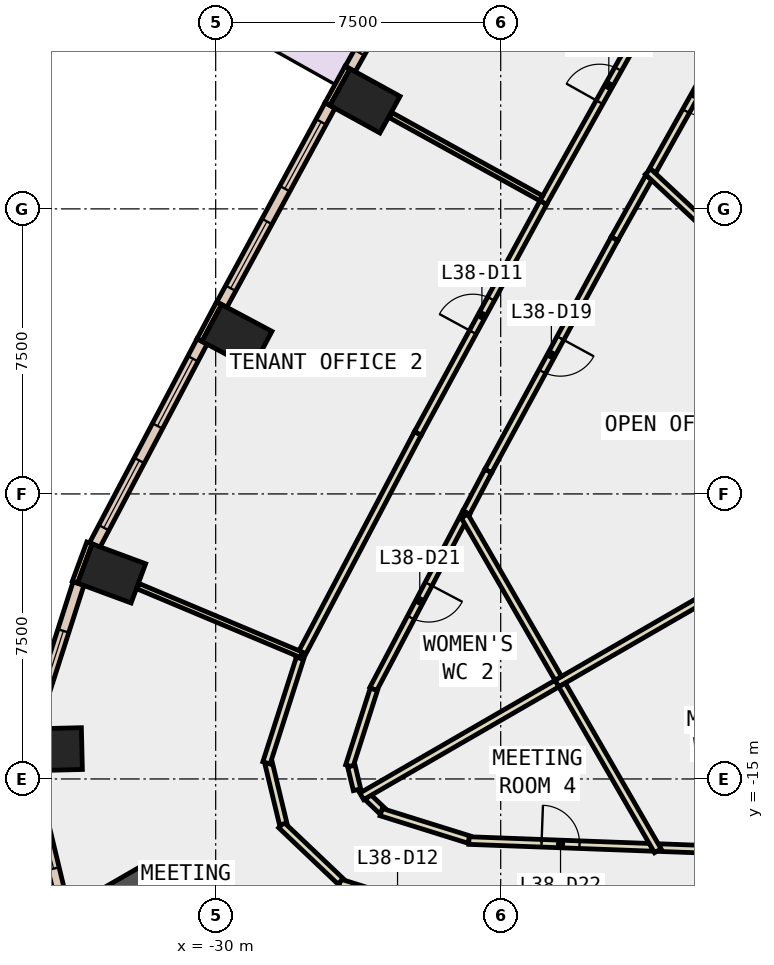
"""IFC4 building model, lengths in metres.
Left out: names, types, materials, properties, quantities, classifications, styles, units other than length and angle.
Written with IfcOpenShell. Run it as: python <this file> out.ifc"""

import sys

from ifc_helpers import new_model, si_unit, direction, frame, frame_2d, origin, origin_2d, place, context, subcontext, project, spatial, rectangle, extrude, element, fill, save


model = new_model("IFC4")
c1 = context("Model", 3, precision=1e-05, world=origin(), true_north=direction((0.0, 1.0)))
c2 = subcontext(c1, "Body", "Model", "MODEL_VIEW")
j1 = project(units=[si_unit("LENGTHUNIT", "METRE"), si_unit("PLANEANGLEUNIT", "RADIAN")], contexts=[c1])
p1 = place(None, origin())
s1 = spatial("IfcSite", under=j1, at=p1, CompositionType="ELEMENT")
p2 = place(p1, origin())
s2 = spatial("IfcBuilding", under=s1, at=p2, CompositionType="ELEMENT")
p3 = place(p2, frame((0.0, 0.0, 171.8)))
s3 = spatial("IfcBuildingStorey", under=s2, at=p3, CompositionType="ELEMENT", Elevation=171.8)
for number, where, z_axis, x_axis in (
    (1, (-26.071, 2.841, -0.4), (0.0, 0.0, 1.0), (0.482, 0.876, 0.0)),
    (2, (-29.44, -3.355, -0.4), (0.0, 0.0, 1.0), (0.47, 0.883, 0.0)),
    (3, (-32.738, -9.593, -0.4), (0.0, 0.0, 1.0), (0.347, 0.938, 0.0)),
    (4, (-34.271, -14.219, -0.4), (0.0, 0.0, 1.0), (-0.024, 1.0, 0.0)),
):
    element("IfcColumn", number, at=place(p3, frame(where, z_axis=z_axis, x_axis=x_axis)), inside=s3, PredefinedType="COLUMN", context=c2, shape_type="SweptSolid", body=[
        extrude(rectangle(XDim=1.1, YDim=1.5, at=origin_2d()), origin(), (0.0, 0.0, 1.0), 4.2),
    ])
p4 = place(p3, frame((-32.244, -18.615, -0.4), z_axis=(0.0, 0.0, 1.0), x_axis=(0.866025403784, 0.5, 0.0)))
e5 = element("IfcColumn", 5, at=p4, inside=s3, PredefinedType="COLUMN", context=c2, shape_type="SweptSolid", body=[
    extrude(rectangle(XDim=2.0, YDim=2.0, at=origin_2d()), origin(), (0.0, 0.0, 1.0), 4.2),
])
for number, where, z_axis, x_axis in (
    (6, (-26.529, 3.721, 0.0), (0.0, 0.0, 1.0), (-0.482, -0.876, 0.0)),
    (7, (-29.909, -2.482, 0.0), (0.0, 0.0, 1.0), (-0.47, -0.883, 0.0)),
    (8, (-33.321, -8.791, 0.0), (0.0, 0.0, 1.0), (-0.346, -0.938, 0.0)),
):
    element("IfcWall", number, at=place(p3, frame(where, z_axis=z_axis, x_axis=x_axis)), inside=s3, PredefinedType="STANDARD", context=c2, shape_type="SweptSolid", body=[
        extrude(rectangle(XDim=1.1, YDim=0.15, at=frame_2d((0.55, 0.0))), origin(), (0.0, 0.0, 1.0), 3.8),
    ])
p5 = place(p3, frame((-23.544, 8.883, 0.0), z_axis=(0.0, 0.0, 1.0), x_axis=(-0.489032196971, -0.87226573378, 0.0)))
e9 = element("IfcWall", 9, at=p5, inside=s3, PredefinedType="STANDARD", context=c2, shape_type="SweptSolid", body=[
    extrude(rectangle(XDim=5.963, YDim=0.3, at=frame_2d((2.981, 0.0))), origin(), (0.0, 0.0, 1.0), 3.8),
])
p6 = place(p5, frame((0.491, 0.0, 0.0)))
e10 = element("IfcOpeningElement", 10, at=p6, cuts=e9, PredefinedType="OPENING", context=c2, shape_type="SweptSolid", body=[
    extrude(rectangle(XDim=2.0, YDim=2.4, at=frame_2d((1.0, 1.2))), frame((0.0, 0.16, 0.0), z_axis=(0.0, -1.0, 0.0), x_axis=(1.0, 0.0, 0.0)), (0.0, 0.0, 1.0), 0.32),
])
p7 = place(p5, frame((3.472, 0.0, 0.9)))
e11 = element("IfcOpeningElement", 11, at=p7, cuts=e9, PredefinedType="OPENING", context=c2, shape_type="SweptSolid", body=[
    extrude(rectangle(XDim=2.0, YDim=2.6, at=frame_2d((1.0, 1.3))), frame((0.0, 0.16, 0.0), z_axis=(0.0, -1.0, 0.0), x_axis=(1.0, 0.0, 0.0)), (0.0, 0.0, 1.0), 0.32),
])
p8 = place(p3, frame((-26.991, 2.72, 0.0), z_axis=(0.0, 0.0, 1.0), x_axis=(-0.477555226268, -0.878601733361, 0.0)))
e12 = element("IfcWall", 12, at=p8, inside=s3, PredefinedType="STANDARD", context=c2, shape_type="SweptSolid", body=[
    extrude(rectangle(XDim=5.964, YDim=0.3, at=frame_2d((2.982, 0.0))), origin(), (0.0, 0.0, 1.0), 3.8),
])
p9 = place(p8, frame((0.491, 0.0, 0.9)))
e13 = element("IfcOpeningElement", 13, at=p9, cuts=e12, PredefinedType="OPENING", context=c2, shape_type="SweptSolid", body=[
    extrude(rectangle(XDim=2.0, YDim=2.6, at=frame_2d((1.0, 1.3))), frame((0.0, 0.16, 0.0), z_axis=(0.0, -1.0, 0.0), x_axis=(1.0, 0.0, 0.0)), (0.0, 0.0, 1.0), 0.32),
])
p10 = place(p8, frame((3.473, 0.0, 0.9)))
e14 = element("IfcOpeningElement", 14, at=p10, cuts=e12, PredefinedType="OPENING", context=c2, shape_type="SweptSolid", body=[
    extrude(rectangle(XDim=2.0, YDim=2.6, at=frame_2d((1.0, 1.3))), frame((0.0, 0.16, 0.0), z_axis=(0.0, -1.0, 0.0), x_axis=(1.0, 0.0, 0.0)), (0.0, 0.0, 1.0), 0.32),
])
p11 = place(p3, frame((-30.358, -3.488, 0.0), z_axis=(0.0, 0.0, 1.0), x_axis=(-0.466399410196, -0.884574242316, 0.0)))
e15 = element("IfcWall", 15, at=p11, inside=s3, PredefinedType="STANDARD", context=c2, shape_type="SweptSolid", body=[
    extrude(rectangle(XDim=6.055, YDim=0.3, at=frame_2d((3.027, 0.0))), origin(), (0.0, 0.0, 1.0), 3.8),
])
p12 = place(p11, frame((0.514, 0.0, 0.9)))
e16 = element("IfcOpeningElement", 16, at=p12, cuts=e15, PredefinedType="OPENING", context=c2, shape_type="SweptSolid", body=[
    extrude(rectangle(XDim=2.0, YDim=2.6, at=frame_2d((1.0, 1.3))), frame((0.0, 0.16, 0.0), z_axis=(0.0, -1.0, 0.0), x_axis=(1.0, 0.0, 0.0)), (0.0, 0.0, 1.0), 0.32),
])
p13 = place(p11, frame((3.541, 0.0, 0.9)))
e17 = element("IfcOpeningElement", 17, at=p13, cuts=e15, PredefinedType="OPENING", context=c2, shape_type="SweptSolid", body=[
    extrude(rectangle(XDim=2.0, YDim=2.6, at=frame_2d((1.0, 1.3))), frame((0.0, 0.16, 0.0), z_axis=(0.0, -1.0, 0.0), x_axis=(1.0, 0.0, 0.0)), (0.0, 0.0, 1.0), 0.32),
])
p14 = place(p3, frame((-33.609, -9.856, 0.0), z_axis=(0.0, 0.0, 1.0), x_axis=(-0.305018133869, -0.952346543025, 0.0)))
e18 = element("IfcWall", 18, at=p14, inside=s3, PredefinedType="STANDARD", context=c2, shape_type="SweptSolid", body=[
    extrude(rectangle(XDim=4.02, YDim=0.3, at=frame_2d((2.01, 0.0))), origin(), (0.0, 0.0, 1.0), 3.8),
])
p15 = place(p14, frame((1.31, 0.0, 0.9)))
e19 = element("IfcOpeningElement", 19, at=p15, cuts=e18, PredefinedType="OPENING", context=c2, shape_type="SweptSolid", body=[
    extrude(rectangle(XDim=1.4, YDim=2.6, at=frame_2d((0.7, 1.3))), frame((0.0, 0.16, 0.0), z_axis=(0.0, -1.0, 0.0), x_axis=(1.0, 0.0, 0.0)), (0.0, 0.0, 1.0), 0.32),
])
p16 = place(p3, frame((-34.886, -14.783, 0.0), z_axis=(0.0, 0.0, 1.0), x_axis=(0.234102046927, -0.972212030179, 0.0)))
e20 = element("IfcWall", 20, at=p16, inside=s3, PredefinedType="STANDARD", context=c2, shape_type="SweptSolid", body=[
    extrude(rectangle(XDim=3.9, YDim=0.3, at=frame_2d((1.95, 0.0))), origin(), (0.0, 0.0, 1.0), 3.8),
])
p17 = place(p16, frame((1.25, 0.0, 0.9)))
e21 = element("IfcOpeningElement", 21, at=p17, cuts=e20, PredefinedType="OPENING", context=c2, shape_type="SweptSolid", body=[
    extrude(rectangle(XDim=1.4, YDim=2.6, at=frame_2d((0.7, 1.3))), frame((0.0, 0.16, 0.0), z_axis=(0.0, -1.0, 0.0), x_axis=(1.0, 0.0, 0.0)), (0.0, 0.0, 1.0), 0.32),
])
p18 = place(p3, frame((-16.255, 5.014, 0.0), z_axis=(0.0, 0.0, 1.0), x_axis=(-0.488988017817, -0.87229050117, 0.0)))
e22 = element("IfcWall", 22, at=p18, inside=s3, PredefinedType="PARTITIONING", context=c2, shape_type="SweptSolid", body=[
    extrude(rectangle(XDim=4.599, YDim=0.2, at=frame_2d((2.3, 0.0))), origin(), (0.0, 0.0, 1.0), 3.8),
])
p19 = place(p18, frame((1.8, 0.0, 0.0)))
e23 = element("IfcOpeningElement", 23, at=p19, cuts=e22, PredefinedType="OPENING", context=c2, shape_type="SweptSolid", body=[
    extrude(rectangle(XDim=1.0, YDim=2.1, at=frame_2d((0.5, 1.05))), frame((0.0, 0.11, 0.0), z_axis=(0.0, -1.0, 0.0), x_axis=(1.0, 0.0, 0.0)), (0.0, 0.0, 1.0), 0.22),
])
p20 = place(p3, frame((-18.602, 0.828, 0.0), z_axis=(0.0, 0.0, 1.0), x_axis=(-0.488969229043, -0.872301033502, 0.0)))
e24 = element("IfcWall", 24, at=p20, inside=s3, PredefinedType="PARTITIONING", context=c2, shape_type="SweptSolid", body=[
    extrude(rectangle(XDim=1.849, YDim=0.2, at=frame_2d((0.924, 0.0))), origin(), (0.0, 0.0, 1.0), 3.8),
])
p21 = place(p3, frame((-19.506, -0.785, 0.0), z_axis=(0.0, 0.0, 1.0), x_axis=(-0.477513909405, -0.878624189472, 0.0)))
e25 = element("IfcWall", 25, at=p21, inside=s3, PredefinedType="PARTITIONING", context=c2, shape_type="SweptSolid", body=[
    extrude(rectangle(XDim=6.956, YDim=0.2, at=frame_2d((3.478, 0.0))), origin(), (0.0, 0.0, 1.0), 3.8),
])
p22 = place(p21, frame((2.978, 0.0, 0.0)))
e26 = element("IfcOpeningElement", 26, at=p22, cuts=e25, PredefinedType="OPENING", context=c2, shape_type="SweptSolid", body=[
    extrude(rectangle(XDim=1.0, YDim=2.1, at=frame_2d((0.5, 1.05))), frame((0.0, 0.11, 0.0), z_axis=(0.0, -1.0, 0.0), x_axis=(1.0, 0.0, 0.0)), (0.0, 0.0, 1.0), 0.22),
])
p23 = place(p3, frame((-22.828, -6.897, 0.0), z_axis=(0.0, 0.0, 1.0), x_axis=(-0.467225806893, -0.884138023938, 0.0)))
e27 = element("IfcWall", 27, at=p23, inside=s3, PredefinedType="PARTITIONING", context=c2, shape_type="SweptSolid", body=[
    extrude(rectangle(XDim=1.237, YDim=0.2, at=frame_2d((0.619, 0.0))), origin(), (0.0, 0.0, 1.0), 3.8),
])
p24 = place(p3, frame((-18.316, -16.807, 0.0), z_axis=(0.0, 0.0, 1.0), x_axis=(0.999315981353, -0.036980662692, 0.0)))
e28 = element("IfcWall", 28, at=p24, inside=s3, PredefinedType="PARTITIONING", context=c2, shape_type="SweptSolid", body=[
    extrude(rectangle(XDim=2.331, YDim=0.2, at=frame_2d((1.165, 0.0))), origin(), (0.0, 0.0, 1.0), 3.8),
])
p25 = place(p3, frame((-23.406, -7.991, 0.0), z_axis=(0.0, 0.0, 1.0), x_axis=(-0.466307932558, -0.884622468646, 0.0)))
e29 = element("IfcWall", 29, at=p25, inside=s3, PredefinedType="PARTITIONING", context=c2, shape_type="SweptSolid", body=[
    extrude(rectangle(XDim=5.25, YDim=0.2, at=frame_2d((2.625, 0.0))), origin(), (0.0, 0.0, 1.0), 3.8),
])
p26 = place(p25, frame((2.125, 0.0, 0.0)))
e30 = element("IfcOpeningElement", 30, at=p26, cuts=e29, PredefinedType="OPENING", context=c2, shape_type="SweptSolid", body=[
    extrude(rectangle(XDim=1.0, YDim=2.1, at=frame_2d((0.5, 1.05))), frame((0.0, 0.11, 0.0), z_axis=(0.0, -1.0, 0.0), x_axis=(1.0, 0.0, 0.0)), (0.0, 0.0, 1.0), 0.22),
])
p27 = place(p3, frame((-25.838, -12.642, 0.0), z_axis=(0.0, 0.0, 1.0), x_axis=(-0.305169069368, -0.952298188122, 0.0)))
e31 = element("IfcWall", 31, at=p27, inside=s3, PredefinedType="PARTITIONING", context=c2, shape_type="SweptSolid", body=[
    extrude(rectangle(XDim=2.117, YDim=0.2, at=frame_2d((1.059, 0.0))), origin(), (0.0, 0.0, 1.0), 3.8),
])
p28 = place(p3, frame((-26.43, -14.66, 0.0), z_axis=(0.0, 0.0, 1.0), x_axis=(0.233574377125, -0.972338938, 0.0)))
e32 = element("IfcWall", 32, at=p28, inside=s3, PredefinedType="PARTITIONING", context=c2, shape_type="SweptSolid", body=[
    extrude(rectangle(XDim=0.642, YDim=0.2, at=frame_2d((0.321, 0.0))), origin(), (0.0, 0.0, 1.0), 3.8),
])
p29 = place(p3, frame((-25.998, -15.476, 0.0), z_axis=(0.0, 0.0, 1.0), x_axis=(0.724294499657, -0.689490737985, 0.0)))
e33 = element("IfcWall", 33, at=p29, inside=s3, PredefinedType="PARTITIONING", context=c2, shape_type="SweptSolid", body=[
    extrude(rectangle(XDim=0.519, YDim=0.2, at=frame_2d((0.26, 0.0))), origin(), (0.0, 0.0, 1.0), 3.8),
])
p30 = place(p3, frame((-25.645, -15.873, 0.0), z_axis=(0.0, 0.0, 1.0), x_axis=(0.95454810771, -0.298056890655, 0.0)))
e34 = element("IfcWall", 34, at=p30, inside=s3, PredefinedType="PARTITIONING", context=c2, shape_type="SweptSolid", body=[
    extrude(rectangle(XDim=2.422, YDim=0.2, at=frame_2d((1.211, 0.0))), origin(), (0.0, 0.0, 1.0), 3.8),
])
p31 = place(p3, frame((-23.337, -16.621, 0.0), z_axis=(0.0, 0.0, 1.0), x_axis=(0.999311710526, -0.037095892019, 0.0)))
e35 = element("IfcWall", 35, at=p31, inside=s3, PredefinedType="PARTITIONING", context=c2, shape_type="SweptSolid", body=[
    extrude(rectangle(XDim=4.824, YDim=0.2, at=frame_2d((2.412, 0.0))), origin(), (0.0, 0.0, 1.0), 3.8),
])
p32 = place(p31, frame((1.913, 0.0, 0.0)))
e36 = element("IfcOpeningElement", 36, at=p32, cuts=e35, PredefinedType="OPENING", context=c2, shape_type="SweptSolid", body=[
    extrude(rectangle(XDim=1.0, YDim=2.1, at=frame_2d((0.5, 1.05))), frame((0.0, 0.11, 0.0), z_axis=(0.0, -1.0, 0.0), x_axis=(1.0, 0.0, 0.0)), (0.0, 0.0, 1.0), 0.22),
])
p33 = place(p3, frame((-21.381, 0.165, 0.0), z_axis=(0.0, 0.0, 1.0), x_axis=(0.489014139272, 0.872275857509, 0.0)))
e37 = element("IfcWall", 37, at=p33, inside=s3, PredefinedType="PARTITIONING", context=c2, shape_type="SweptSolid", body=[
    extrude(rectangle(XDim=7.057, YDim=0.2, at=frame_2d((3.529, 0.0))), origin(), (0.0, 0.0, 1.0), 3.8),
])
p34 = place(p33, frame((3.029, 0.0, 0.0)))
e38 = element("IfcOpeningElement", 38, at=p34, cuts=e37, PredefinedType="OPENING", context=c2, shape_type="SweptSolid", body=[
    extrude(rectangle(XDim=1.0, YDim=2.1, at=frame_2d((0.5, 1.05))), frame((0.0, 0.11, 0.0), z_axis=(0.0, -1.0, 0.0), x_axis=(1.0, 0.0, 0.0)), (0.0, 0.0, 1.0), 0.22),
])
p35 = place(p3, frame((-27.798, -11.819, 0.0), z_axis=(0.0, 0.0, 1.0), x_axis=(0.466450727507, 0.884547182918, 0.0)))
e39 = element("IfcWall", 39, at=p35, inside=s3, PredefinedType="PARTITIONING", context=c2, shape_type="SweptSolid", body=[
    extrude(rectangle(XDim=6.685, YDim=0.2, at=frame_2d((3.342, 0.0))), origin(), (0.0, 0.0, 1.0), 3.8),
])
p36 = place(p3, frame((-24.68, -5.906, 0.0), z_axis=(0.0, 0.0, 1.0), x_axis=(0.47757676389, 0.878590026459, 0.0)))
e40 = element("IfcWall", 40, at=p36, inside=s3, PredefinedType="PARTITIONING", context=c2, shape_type="SweptSolid", body=[
    extrude(rectangle(XDim=6.91, YDim=0.2, at=frame_2d((3.455, 0.0))), origin(), (0.0, 0.0, 1.0), 3.8),
])
p37 = place(p36, frame((3.029, 0.0, 0.0)))
e41 = element("IfcOpeningElement", 41, at=p37, cuts=e40, PredefinedType="OPENING", context=c2, shape_type="SweptSolid", body=[
    extrude(rectangle(XDim=1.0, YDim=2.1, at=frame_2d((0.5, 1.05))), frame((0.0, 0.11, 0.0), z_axis=(0.0, -1.0, 0.0), x_axis=(1.0, 0.0, 0.0)), (0.0, 0.0, 1.0), 0.22),
])
p38 = place(p3, frame((-23.691, -18.683, 0.0), z_axis=(0.0, 0.0, 1.0), x_axis=(-0.954546657381, 0.298061535398, 0.0)))
e42 = element("IfcWall", 42, at=p38, inside=s3, PredefinedType="PARTITIONING", context=c2, shape_type="SweptSolid", body=[
    extrude(rectangle(XDim=3.191, YDim=0.2, at=frame_2d((1.596, 0.0))), origin(), (0.0, 0.0, 1.0), 3.8),
])
p39 = place(p38, frame((1.096, 0.0, 0.0)))
e43 = element("IfcOpeningElement", 43, at=p39, cuts=e42, PredefinedType="OPENING", context=c2, shape_type="SweptSolid", body=[
    extrude(rectangle(XDim=1.0, YDim=2.1, at=frame_2d((0.5, 1.05))), frame((0.0, 0.11, 0.0), z_axis=(0.0, -1.0, 0.0), x_axis=(1.0, 0.0, 0.0)), (0.0, 0.0, 1.0), 0.22),
])
p40 = place(p3, frame((-26.714, -17.693, 0.0), z_axis=(0.0, 0.0, 1.0), x_axis=(-0.724712974479, 0.689050872303, 0.0)))
e44 = element("IfcWall", 44, at=p40, inside=s3, PredefinedType="PARTITIONING", context=c2, shape_type="SweptSolid", body=[
    extrude(rectangle(XDim=2.15, YDim=0.2, at=frame_2d((1.075, 0.0))), origin(), (0.0, 0.0, 1.0), 3.8),
])
p41 = place(p3, frame((-28.223, -16.184, 0.0), z_axis=(0.0, 0.0, 1.0), x_axis=(-0.233826017197, 0.972278454807, 0.0)))
e45 = element("IfcWall", 45, at=p41, inside=s3, PredefinedType="PARTITIONING", context=c2, shape_type="SweptSolid", body=[
    extrude(rectangle(XDim=1.651, YDim=0.2, at=frame_2d((0.825, 0.0))), origin(), (0.0, 0.0, 1.0), 3.8),
])
p42 = place(p3, frame((-28.663, -14.577, 0.0), z_axis=(0.0, 0.0, 1.0), x_axis=(0.304925942137, 0.952376065329, 0.0)))
e46 = element("IfcWall", 46, at=p42, inside=s3, PredefinedType="PARTITIONING", context=c2, shape_type="SweptSolid", body=[
    extrude(rectangle(XDim=2.89, YDim=0.2, at=frame_2d((1.445, 0.0))), origin(), (0.0, 0.0, 1.0), 3.8),
])
p43 = place(p3, frame((-11.372, -5.79, 0.0), z_axis=(0.0, 0.0, 1.0), x_axis=(-0.730922728623, 0.682460229451, 0.0)))
e47 = element("IfcWall", 47, at=p43, inside=s3, PredefinedType="PARTITIONING", context=c2, shape_type="SweptSolid", body=[
    extrude(rectangle(XDim=9.924, YDim=0.2, at=frame_2d((4.962, 0.0))), origin(), (0.0, 0.0, 1.0), 3.8),
])
p44 = place(p3, frame((-16.952, -10.138, 0.0), z_axis=(0.0, 0.0, 1.0), x_axis=(-0.866054992606, -0.499948747156, 0.0)))
e48 = element("IfcWall", 48, at=p44, inside=s3, PredefinedType="PARTITIONING", context=c2, shape_type="SweptSolid", body=[
    extrude(rectangle(XDim=4.701, YDim=0.2, at=frame_2d((2.35, 0.0))), origin(), (0.0, 0.0, 1.0), 3.8),
])
p45 = place(p3, frame((-20.986, -12.351, 0.0), z_axis=(0.0, 0.0, 1.0), x_axis=(-0.499993851206, 0.866028953763, 0.0)))
e49 = element("IfcWall", 49, at=p45, inside=s3, PredefinedType="PARTITIONING", context=c2, shape_type="SweptSolid", body=[
    extrude(rectangle(XDim=4.932, YDim=0.2, at=frame_2d((2.466, 0.0))), origin(), (0.0, 0.0, 1.0), 3.8),
])
p46 = place(p3, frame((-18.366, -16.89, 0.0), z_axis=(0.0, 0.0, 1.0), x_axis=(-0.499965828395, 0.866045131871, 0.0)))
e50 = element("IfcWall", 50, at=p46, inside=s3, PredefinedType="PARTITIONING", context=c2, shape_type="SweptSolid", body=[
    extrude(rectangle(XDim=5.036, YDim=0.2, at=frame_2d((2.518, 0.0))), origin(), (0.0, 0.0, 1.0), 3.8),
])
p47 = place(p3, frame((-21.021, -12.491, 0.0), z_axis=(0.0, 0.0, 1.0), x_axis=(-0.865966890845, -0.500101333692, 0.0)))
e51 = element("IfcWall", 51, at=p47, inside=s3, PredefinedType="PARTITIONING", context=c2, shape_type="SweptSolid", body=[
    extrude(rectangle(XDim=5.931, YDim=0.2, at=frame_2d((2.965, 0.0))), origin(), (0.0, 0.0, 1.0), 3.8),
])
p48 = place(p3, frame((-21.432, 0.278, 0.0), z_axis=(0.0, 0.0, 1.0), x_axis=(-0.875412579047, 0.483376474857, 0.0)))
e52 = element("IfcWall", 52, at=p48, inside=s3, PredefinedType="PARTITIONING", context=c2, shape_type="SweptSolid", body=[
    extrude(rectangle(XDim=4.531, YDim=0.15, at=frame_2d((2.265, 0.0))), origin(), (0.0, 0.0, 1.0), 3.8),
])
p49 = place(p3, frame((-27.751, -11.73, 0.0), z_axis=(0.0, 0.0, 1.0), x_axis=(-0.92196786851, 0.387266380462, 0.0)))
e53 = element("IfcWall", 53, at=p49, inside=s3, PredefinedType="PARTITIONING", context=c2, shape_type="SweptSolid", body=[
    extrude(rectangle(XDim=4.653, YDim=0.15, at=frame_2d((2.327, 0.0))), origin(), (0.0, 0.0, 1.0), 3.8),
])
p50 = place(p7, origin())
e54 = element("IfcWindow", 54, at=p50, inside=s3, PartitioningType="SINGLE_PANEL", PredefinedType="WINDOW", context=c2, shape_type="SweptSolid", body=[
    extrude(rectangle(XDim=2.0, YDim=2.6, at=frame_2d((1.0, 1.3))), frame((0.0, 0.03, 0.0), z_axis=(0.0, -1.0, 0.0), x_axis=(1.0, 0.0, 0.0)), (0.0, 0.0, 1.0), 0.06),
])
fill(e11, e54)
p51 = place(p9, origin())
e55 = element("IfcWindow", 55, at=p51, inside=s3, PartitioningType="SINGLE_PANEL", PredefinedType="WINDOW", context=c2, shape_type="SweptSolid", body=[
    extrude(rectangle(XDim=2.0, YDim=2.6, at=frame_2d((1.0, 1.3))), frame((0.0, 0.03, 0.0), z_axis=(0.0, -1.0, 0.0), x_axis=(1.0, 0.0, 0.0)), (0.0, 0.0, 1.0), 0.06),
])
fill(e13, e55)
p52 = place(p10, origin())
e56 = element("IfcWindow", 56, at=p52, inside=s3, PartitioningType="SINGLE_PANEL", PredefinedType="WINDOW", context=c2, shape_type="SweptSolid", body=[
    extrude(rectangle(XDim=2.0, YDim=2.6, at=frame_2d((1.0, 1.3))), frame((0.0, 0.03, 0.0), z_axis=(0.0, -1.0, 0.0), x_axis=(1.0, 0.0, 0.0)), (0.0, 0.0, 1.0), 0.06),
])
fill(e14, e56)
p53 = place(p12, origin())
e57 = element("IfcWindow", 57, at=p53, inside=s3, PartitioningType="SINGLE_PANEL", PredefinedType="WINDOW", context=c2, shape_type="SweptSolid", body=[
    extrude(rectangle(XDim=2.0, YDim=2.6, at=frame_2d((1.0, 1.3))), frame((0.0, 0.03, 0.0), z_axis=(0.0, -1.0, 0.0), x_axis=(1.0, 0.0, 0.0)), (0.0, 0.0, 1.0), 0.06),
])
fill(e16, e57)
p54 = place(p13, origin())
e58 = element("IfcWindow", 58, at=p54, inside=s3, PartitioningType="SINGLE_PANEL", PredefinedType="WINDOW", context=c2, shape_type="SweptSolid", body=[
    extrude(rectangle(XDim=2.0, YDim=2.6, at=frame_2d((1.0, 1.3))), frame((0.0, 0.03, 0.0), z_axis=(0.0, -1.0, 0.0), x_axis=(1.0, 0.0, 0.0)), (0.0, 0.0, 1.0), 0.06),
])
fill(e17, e58)
p55 = place(p15, origin())
e59 = element("IfcWindow", 59, at=p55, inside=s3, PartitioningType="SINGLE_PANEL", PredefinedType="WINDOW", context=c2, shape_type="SweptSolid", body=[
    extrude(rectangle(XDim=1.4, YDim=2.6, at=frame_2d((0.7, 1.3))), frame((0.0, 0.03, 0.0), z_axis=(0.0, -1.0, 0.0), x_axis=(1.0, 0.0, 0.0)), (0.0, 0.0, 1.0), 0.06),
])
fill(e19, e59)
p56 = place(p17, origin())
e60 = element("IfcWindow", 60, at=p56, inside=s3, PartitioningType="SINGLE_PANEL", PredefinedType="WINDOW", context=c2, shape_type="SweptSolid", body=[
    extrude(rectangle(XDim=1.4, YDim=2.6, at=frame_2d((0.7, 1.3))), frame((0.0, 0.03, 0.0), z_axis=(0.0, -1.0, 0.0), x_axis=(1.0, 0.0, 0.0)), (0.0, 0.0, 1.0), 0.06),
])
fill(e21, e60)
p57 = place(p34, origin())
e61 = element("IfcDoor", 61, at=p57, inside=s3, OperationType="SINGLE_SWING_RIGHT", PredefinedType="DOOR", context=c2, shape_type="SweptSolid", body=[
    extrude(rectangle(XDim=1.0, YDim=2.1, at=frame_2d((0.5, 1.05))), frame((0.0, 0.025, 0.0), z_axis=(0.0, -1.0, 0.0), x_axis=(1.0, 0.0, 0.0)), (0.0, 0.0, 1.0), 0.05),
])
fill(e38, e61)
p58 = place(p37, origin())
e62 = element("IfcDoor", 62, at=p58, inside=s3, OperationType="SINGLE_SWING_LEFT", PredefinedType="DOOR", context=c2, shape_type="SweptSolid", body=[
    extrude(rectangle(XDim=1.0, YDim=2.1, at=frame_2d((0.5, 1.05))), frame((0.0, 0.025, 0.0), z_axis=(0.0, -1.0, 0.0), x_axis=(1.0, 0.0, 0.0)), (0.0, 0.0, 1.0), 0.05),
])
fill(e41, e62)
p59 = place(p19, origin())
e63 = element("IfcDoor", 63, at=p59, inside=s3, OperationType="SINGLE_SWING_LEFT", PredefinedType="DOOR", context=c2, shape_type="SweptSolid", body=[
    extrude(rectangle(XDim=1.0, YDim=2.1, at=frame_2d((0.5, 1.05))), frame((0.0, 0.025, 0.0), z_axis=(0.0, -1.0, 0.0), x_axis=(1.0, 0.0, 0.0)), (0.0, 0.0, 1.0), 0.05),
])
fill(e23, e63)
p60 = place(p22, origin())
e64 = element("IfcDoor", 64, at=p60, inside=s3, OperationType="SINGLE_SWING_LEFT", PredefinedType="DOOR", context=c2, shape_type="SweptSolid", body=[
    extrude(rectangle(XDim=1.0, YDim=2.1, at=frame_2d((0.5, 1.05))), frame((0.0, 0.025, 0.0), z_axis=(0.0, -1.0, 0.0), x_axis=(1.0, 0.0, 0.0)), (0.0, 0.0, 1.0), 0.05),
])
fill(e26, e64)
p61 = place(p26, origin())
e65 = element("IfcDoor", 65, at=p61, inside=s3, OperationType="SINGLE_SWING_LEFT", PredefinedType="DOOR", context=c2, shape_type="SweptSolid", body=[
    extrude(rectangle(XDim=1.0, YDim=2.1, at=frame_2d((0.5, 1.05))), frame((0.0, 0.025, 0.0), z_axis=(0.0, -1.0, 0.0), x_axis=(1.0, 0.0, 0.0)), (0.0, 0.0, 1.0), 0.05),
])
fill(e30, e65)
p62 = place(p32, origin())
e66 = element("IfcDoor", 66, at=p62, inside=s3, OperationType="SINGLE_SWING_LEFT", PredefinedType="DOOR", context=c2, shape_type="SweptSolid", body=[
    extrude(rectangle(XDim=1.0, YDim=2.1, at=frame_2d((0.5, 1.05))), frame((0.0, 0.025, 0.0), z_axis=(0.0, -1.0, 0.0), x_axis=(1.0, 0.0, 0.0)), (0.0, 0.0, 1.0), 0.05),
])
fill(e36, e66)
save(model, sys.argv[1])
